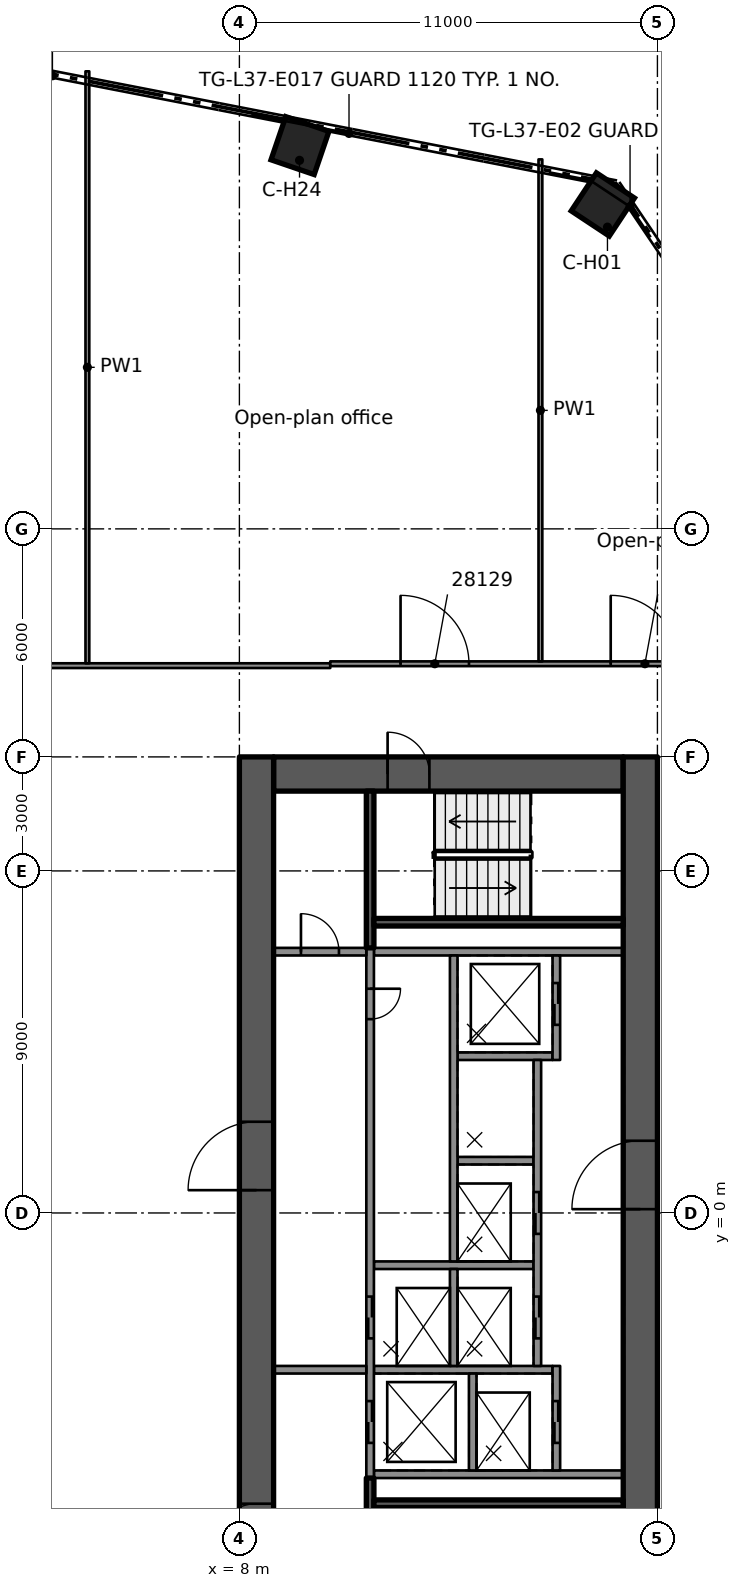
"""IFC4 building model, lengths in metres.
Left out: names, types, materials, properties, quantities, classifications, styles, units other than length and angle.
Written with IfcOpenShell. Run it as: python <this file> out.ifc"""

import sys

from ifc_helpers import new_model, si_unit, direction, frame, frame_2d, origin, origin_2d, place, context, subcontext, project, spatial, rectangle, extrude, element, fill, save


model = new_model("IFC4")
c1 = context("Model", 3, precision=1e-05, world=origin(), true_north=direction((0.0, 1.0)))
c2 = subcontext(c1, "Body", "Model", "MODEL_VIEW")
j1 = project(units=[si_unit("LENGTHUNIT", "METRE"), si_unit("PLANEANGLEUNIT", "RADIAN")], contexts=[c1])
p1 = place(None, origin())
s1 = spatial("IfcSite", under=j1, at=p1, CompositionType="ELEMENT")
p2 = place(p1, origin())
s2 = spatial("IfcBuilding", under=s1, at=p2, CompositionType="ELEMENT")
p3 = place(p2, frame((0.0, 0.0, 145.6)))
s3 = spatial("IfcBuildingStorey", under=s2, at=p3, CompositionType="ELEMENT", Elevation=145.6)
p4 = place(p3, frame((8.9, 11.55, 0.0), z_axis=(0.0, 0.0, 1.0), x_axis=(1.0, 0.0, 0.0)))
e1 = element("IfcWall", 1, at=p4, inside=s3, PredefinedType="SHEAR", context=c2, shape_type="SweptSolid", body=[
    extrude(rectangle(XDim=9.2, YDim=0.9, at=frame_2d((4.6, 0.0))), origin(), (0.0, 0.0, 1.0), 3.5),
])
p5 = place(p4, frame((3.0, 0.0, 0.0)))
e2 = element("IfcOpeningElement", 2, at=p5, cuts=e1, PredefinedType="OPENING", context=c2, shape_type="SweptSolid", body=[
    extrude(rectangle(XDim=1.1, YDim=2.1, at=frame_2d((0.55, 1.05))), frame((0.0, 0.46, 0.0), z_axis=(0.0, -1.0, 0.0), x_axis=(1.0, 0.0, 0.0)), (0.0, 0.0, 1.0), 0.92),
])
p6 = place(p3, frame((8.45, -12.0, 0.0), z_axis=(0.0, 0.0, 1.0), x_axis=(0.0, 1.0, 0.0)))
e3 = element("IfcWall", 3, at=p6, inside=s3, PredefinedType="SHEAR", context=c2, shape_type="SweptSolid", body=[
    extrude(rectangle(XDim=24.0, YDim=0.9, at=frame_2d((12.0, 0.0))), origin(), (0.0, 0.0, 1.0), 3.5),
])
p7 = place(p6, frame((12.6, 0.0, 0.0)))
e4 = element("IfcOpeningElement", 4, at=p7, cuts=e3, PredefinedType="OPENING", context=c2, shape_type="SweptSolid", body=[
    extrude(rectangle(XDim=1.8, YDim=2.1, at=frame_2d((0.9, 1.05))), frame((0.0, 0.46, 0.0), z_axis=(0.0, -1.0, 0.0), x_axis=(1.0, 0.0, 0.0)), (0.0, 0.0, 1.0), 0.92),
])
p8 = place(p6, frame((3.25, 0.0, 0.0)))
e5 = element("IfcOpeningElement", 5, at=p8, cuts=e3, PredefinedType="OPENING", context=c2, shape_type="SweptSolid", body=[
    extrude(rectangle(XDim=1.1, YDim=2.1, at=frame_2d((0.55, 1.05))), frame((0.0, 0.46, 0.0), z_axis=(0.0, -1.0, 0.0), x_axis=(1.0, 0.0, 0.0)), (0.0, 0.0, 1.0), 0.92),
])
p9 = place(p3, frame((18.55, -12.0, 0.0), z_axis=(0.0, 0.0, 1.0), x_axis=(0.0, 1.0, 0.0)))
e6 = element("IfcWall", 6, at=p9, inside=s3, PredefinedType="SHEAR", context=c2, shape_type="SweptSolid", body=[
    extrude(rectangle(XDim=24.0, YDim=0.9, at=frame_2d((12.0, 0.0))), origin(), (0.0, 0.0, 1.0), 3.5),
])
p10 = place(p9, frame((12.1, 0.0, 0.0)))
e7 = element("IfcOpeningElement", 7, at=p10, cuts=e6, PredefinedType="OPENING", context=c2, shape_type="SweptSolid", body=[
    extrude(rectangle(XDim=1.8, YDim=2.1, at=frame_2d((0.9, 1.05))), frame((0.0, 0.46, 0.0), z_axis=(0.0, -1.0, 0.0), x_axis=(1.0, 0.0, 0.0)), (0.0, 0.0, 1.0), 0.92),
])
for number, where, z_axis, x_axis in (
    (8, (17.564, 26.536, 0.0), (0.0, 0.0, 1.0), (0.552, 0.834, 0.0)),
    (9, (9.594, 28.085, 0.0), (0.0, 0.0, 1.0), (0.323, 0.946, 0.0)),
):
    element("IfcColumn", number, at=place(p3, frame(where, z_axis=z_axis, x_axis=x_axis)), inside=s3, PredefinedType="COLUMN", context=c2, shape_type="SweptSolid", body=[
        extrude(rectangle(XDim=1.2, YDim=1.2, at=origin_2d()), origin(), (0.0, 0.0, 1.0), 3.5),
    ])
for number, where, z_axis, x_axis in (
    (10, (11.54, -6.875, 0.0), (0.0, 0.0, 1.0), (1.0, 0.0, 0.0)),
    (11, (11.54, 6.875, 0.0), (0.0, 0.0, 1.0), (1.0, 0.0, 0.0)),
):
    element("IfcWall", number, at=place(p3, frame(where, z_axis=z_axis, x_axis=x_axis)), inside=s3, PredefinedType="SOLIDWALL", context=c2, shape_type="SweptSolid", body=[
        extrude(rectangle(XDim=6.56, YDim=0.2, at=frame_2d((3.28, 0.0))), origin(), (0.0, 0.0, 1.0), 3.09),
    ])
p11 = place(p3, frame((13.74, 4.125, 0.0), z_axis=(0.0, 0.0, 1.0), x_axis=(1.0, 0.0, 0.0)))
e12 = element("IfcWall", 12, at=p11, inside=s3, PredefinedType="SOLIDWALL", context=c2, shape_type="SweptSolid", body=[
    extrude(rectangle(XDim=2.5, YDim=0.2, at=frame_2d((1.25, 0.0))), origin(), (0.0, 0.0, 1.0), 3.09),
])
p12 = place(p3, frame((13.74, 1.375, 0.0), z_axis=(0.0, 0.0, 1.0), x_axis=(1.0, 0.0, 0.0)))
e13 = element("IfcWall", 13, at=p12, inside=s3, PredefinedType="SOLIDWALL", context=c2, shape_type="SweptSolid", body=[
    extrude(rectangle(XDim=2.0, YDim=0.2, at=frame_2d((1.0, 0.0))), origin(), (0.0, 0.0, 1.0), 3.09),
])
p13 = place(p3, frame((11.54, -1.375, 0.0), z_axis=(0.0, 0.0, 1.0), x_axis=(1.0, 0.0, 0.0)))
e14 = element("IfcWall", 14, at=p13, inside=s3, PredefinedType="SOLIDWALL", context=c2, shape_type="SweptSolid", body=[
    extrude(rectangle(XDim=4.2, YDim=0.2, at=frame_2d((2.1, 0.0))), origin(), (0.0, 0.0, 1.0), 3.09),
])
p14 = place(p3, frame((11.54, -4.125, 0.0), z_axis=(0.0, 0.0, 1.0), x_axis=(1.0, 0.0, 0.0)))
e15 = element("IfcWall", 15, at=p14, inside=s3, PredefinedType="SOLIDWALL", context=c2, shape_type="SweptSolid", body=[
    extrude(rectangle(XDim=4.7, YDim=0.2, at=frame_2d((2.35, 0.0))), origin(), (0.0, 0.0, 1.0), 3.09),
])
p15 = place(p3, frame((11.44, 6.975, 0.0), z_axis=(0.0, 0.0, 1.0), x_axis=(0.0, -1.0, 0.0)))
e16 = element("IfcWall", 16, at=p15, inside=s3, PredefinedType="SOLIDWALL", context=c2, shape_type="SweptSolid", body=[
    extrude(rectangle(XDim=13.95, YDim=0.2, at=frame_2d((6.975, 0.0))), origin(), (0.0, 0.0, 1.0), 3.09),
])
p16 = place(p15, frame((9.175, 0.0, 0.0)))
e17 = element("IfcOpeningElement", 17, at=p16, cuts=e16, PredefinedType="OPENING", context=c2, shape_type="SweptSolid", body=[
    extrude(rectangle(XDim=1.1, YDim=2.1, at=frame_2d((0.55, 1.05))), frame((0.0, 0.11, 0.0), z_axis=(0.0, -1.0, 0.0), x_axis=(1.0, 0.0, 0.0)), (0.0, 0.0, 1.0), 0.22),
])
p17 = place(p15, frame((11.925, 0.0, 0.0)))
e18 = element("IfcOpeningElement", 18, at=p17, cuts=e16, PredefinedType="OPENING", context=c2, shape_type="SweptSolid", body=[
    extrude(rectangle(XDim=1.1, YDim=2.1, at=frame_2d((0.55, 1.05))), frame((0.0, 0.11, 0.0), z_axis=(0.0, -1.0, 0.0), x_axis=(1.0, 0.0, 0.0)), (0.0, 0.0, 1.0), 0.22),
])
p18 = place(p15, frame((1.075, 0.0, 0.0)))
e19 = element("IfcOpeningElement", 19, at=p18, cuts=e16, PredefinedType="OPENING", context=c2, shape_type="SweptSolid", body=[
    extrude(rectangle(XDim=0.8, YDim=2.1, at=frame_2d((0.4, 1.05))), frame((0.0, 0.11, 0.0), z_axis=(0.0, -1.0, 0.0), x_axis=(1.0, 0.0, 0.0)), (0.0, 0.0, 1.0), 0.22),
])
p19 = place(p3, frame((13.64, 6.775, 0.0), z_axis=(0.0, 0.0, 1.0), x_axis=(0.0, -1.0, 0.0)))
e20 = element("IfcWall", 20, at=p19, inside=s3, PredefinedType="SOLIDWALL", context=c2, shape_type="SweptSolid", body=[
    extrude(rectangle(XDim=8.05, YDim=0.2, at=frame_2d((4.025, 0.0))), origin(), (0.0, 0.0, 1.0), 3.09),
])
for number, where, z_axis, x_axis in (
    (21, (13.64, -1.475, 0.0), (0.0, 0.0, 1.0), (0.0, -1.0, 0.0)),
    (22, (14.14, -4.225, 0.0), (0.0, 0.0, 1.0), (0.0, -1.0, 0.0)),
):
    element("IfcWall", number, at=place(p3, frame(where, z_axis=z_axis, x_axis=x_axis)), inside=s3, PredefinedType="SOLIDWALL", context=c2, shape_type="SweptSolid", body=[
        extrude(rectangle(XDim=2.55, YDim=0.2, at=frame_2d((1.275, 0.0))), origin(), (0.0, 0.0, 1.0), 3.09),
    ])
p20 = place(p3, frame((16.34, 6.775, 0.0), z_axis=(0.0, 0.0, 1.0), x_axis=(0.0, -1.0, 0.0)))
e23 = element("IfcWall", 23, at=p20, inside=s3, PredefinedType="SOLIDWALL", context=c2, shape_type="SweptSolid", body=[
    extrude(rectangle(XDim=2.75, YDim=0.2, at=frame_2d((1.375, 0.0))), origin(), (0.0, 0.0, 1.0), 3.09),
])
p21 = place(p20, frame((0.725, 0.0, 0.0)))
e24 = element("IfcOpeningElement", 24, at=p21, cuts=e23, PredefinedType="OPENING", context=c2, shape_type="SweptSolid", body=[
    extrude(rectangle(XDim=1.1, YDim=2.1, at=frame_2d((0.55, 1.05))), frame((0.0, 0.11, 0.0), z_axis=(0.0, -1.0, 0.0), x_axis=(1.0, 0.0, 0.0)), (0.0, 0.0, 1.0), 0.22),
])
p22 = place(p3, frame((15.84, 4.025, 0.0), z_axis=(0.0, 0.0, 1.0), x_axis=(0.0, -1.0, 0.0)))
e25 = element("IfcWall", 25, at=p22, inside=s3, PredefinedType="SOLIDWALL", context=c2, shape_type="SweptSolid", body=[
    extrude(rectangle(XDim=8.05, YDim=0.2, at=frame_2d((4.025, 0.0))), origin(), (0.0, 0.0, 1.0), 3.09),
])
p23 = place(p22, frame((3.475, 0.0, 0.0)))
e26 = element("IfcOpeningElement", 26, at=p23, cuts=e25, PredefinedType="OPENING", context=c2, shape_type="SweptSolid", body=[
    extrude(rectangle(XDim=1.1, YDim=2.1, at=frame_2d((0.55, 1.05))), frame((0.0, 0.11, 0.0), z_axis=(0.0, -1.0, 0.0), x_axis=(1.0, 0.0, 0.0)), (0.0, 0.0, 1.0), 0.22),
])
p24 = place(p22, frame((6.225, 0.0, 0.0)))
e27 = element("IfcOpeningElement", 27, at=p24, cuts=e25, PredefinedType="OPENING", context=c2, shape_type="SweptSolid", body=[
    extrude(rectangle(XDim=1.1, YDim=2.1, at=frame_2d((0.55, 1.05))), frame((0.0, 0.11, 0.0), z_axis=(0.0, -1.0, 0.0), x_axis=(1.0, 0.0, 0.0)), (0.0, 0.0, 1.0), 0.22),
])
p25 = place(p3, frame((16.34, -4.025, 0.0), z_axis=(0.0, 0.0, 1.0), x_axis=(0.0, -1.0, 0.0)))
e28 = element("IfcWall", 28, at=p25, inside=s3, PredefinedType="SOLIDWALL", context=c2, shape_type="SweptSolid", body=[
    extrude(rectangle(XDim=2.75, YDim=0.2, at=frame_2d((1.375, 0.0))), origin(), (0.0, 0.0, 1.0), 3.09),
])
p26 = place(p25, frame((0.925, 0.0, 0.0)))
e29 = element("IfcOpeningElement", 29, at=p26, cuts=e28, PredefinedType="OPENING", context=c2, shape_type="SweptSolid", body=[
    extrude(rectangle(XDim=1.1, YDim=2.1, at=frame_2d((0.55, 1.05))), frame((0.0, 0.11, 0.0), z_axis=(0.0, -1.0, 0.0), x_axis=(1.0, 0.0, 0.0)), (0.0, 0.0, 1.0), 0.22),
])
p27 = place(p3, frame((11.44, -6.975, 0.0), z_axis=(0.0, 0.0, 1.0), x_axis=(0.0, -1.0, 0.0)))
e30 = element("IfcWall", 30, at=p27, inside=s3, PredefinedType="SOLIDWALL", context=c2, shape_type="SweptSolid", body=[
    extrude(rectangle(XDim=4.125, YDim=0.2, at=frame_2d((2.062, 0.0))), origin(), (0.0, 0.0, 1.0), 3.09),
])
p28 = place(p27, frame((2.1, 0.0, 0.0)))
e31 = element("IfcOpeningElement", 31, at=p28, cuts=e30, PredefinedType="OPENING", context=c2, shape_type="SweptSolid", body=[
    extrude(rectangle(XDim=1.1, YDim=2.1, at=frame_2d((0.55, 1.05))), frame((0.0, 0.11, 0.0), z_axis=(0.0, -1.0, 0.0), x_axis=(1.0, 0.0, 0.0)), (0.0, 0.0, 1.0), 0.22),
])
p29 = place(p3, frame((11.54, -7.65, 0.0), z_axis=(0.0, 0.0, 1.0), x_axis=(1.0, 0.0, 0.0)))
e32 = element("IfcWall", 32, at=p29, inside=s3, PredefinedType="SOLIDWALL", context=c2, shape_type="SweptSolid", body=[
    extrude(rectangle(XDim=6.56, YDim=0.2, at=frame_2d((3.28, 0.0))), origin(), (0.0, 0.0, 1.0), 3.09),
])
p30 = place(p3, frame((11.44, 11.1, 0.0), z_axis=(0.0, 0.0, 1.0), x_axis=(0.0, -1.0, 0.0)))
e33 = element("IfcWall", 33, at=p30, inside=s3, PredefinedType="SOLIDWALL", context=c2, shape_type="SweptSolid", body=[
    extrude(rectangle(XDim=4.125, YDim=0.2, at=frame_2d((2.062, 0.0))), origin(), (0.0, 0.0, 1.0), 3.09),
])
p31 = place(p3, frame((11.54, 7.65, 0.0), z_axis=(0.0, 0.0, 1.0), x_axis=(1.0, 0.0, 0.0)))
e34 = element("IfcWall", 34, at=p31, inside=s3, PredefinedType="SOLIDWALL", context=c2, shape_type="SweptSolid", body=[
    extrude(rectangle(XDim=6.56, YDim=0.2, at=frame_2d((3.28, 0.0))), origin(), (0.0, 0.0, 1.0), 3.09),
])
p32 = place(p3, frame((8.9, -4.125, 0.0), z_axis=(0.0, 0.0, 1.0), x_axis=(1.0, 0.0, 0.0)))
e35 = element("IfcWall", 35, at=p32, inside=s3, PredefinedType="PARTITIONING", context=c2, shape_type="SweptSolid", body=[
    extrude(rectangle(XDim=2.44, YDim=0.2, at=frame_2d((1.22, 0.0))), origin(), (0.0, 0.0, 1.0), 3.09),
])
p33 = place(p3, frame((8.9, 6.875, 0.0), z_axis=(0.0, 0.0, 1.0), x_axis=(1.0, 0.0, 0.0)))
e36 = element("IfcWall", 36, at=p33, inside=s3, PredefinedType="PARTITIONING", context=c2, shape_type="SweptSolid", body=[
    extrude(rectangle(XDim=2.44, YDim=0.2, at=frame_2d((1.22, 0.0))), origin(), (0.0, 0.0, 1.0), 3.09),
])
p34 = place(p33, frame((0.72, 0.0, 0.0)))
e37 = element("IfcOpeningElement", 37, at=p34, cuts=e36, PredefinedType="OPENING", context=c2, shape_type="SweptSolid", body=[
    extrude(rectangle(XDim=1.0, YDim=2.1, at=frame_2d((0.5, 1.05))), frame((0.0, 0.11, 0.0), z_axis=(0.0, -1.0, 0.0), x_axis=(1.0, 0.0, 0.0)), (0.0, 0.0, 1.0), 0.22),
])
p35 = place(p3, frame((-10.39, 14.401, 0.0), z_axis=(0.0, 0.0, 1.0), x_axis=(1.0, 0.0, 0.0)))
e38 = element("IfcWall", 38, at=p35, inside=s3, PredefinedType="PARTITIONING", context=c2, shape_type="SweptSolid", body=[
    extrude(rectangle(XDim=20.781, YDim=0.125, at=frame_2d((10.391, 0.0))), origin(), (0.0, 0.0, 1.0), 3.08),
])
p36 = place(p35, frame((10.295, 0.0, 0.0)))
e39 = element("IfcOpeningElement", 39, at=p36, cuts=e38, PredefinedType="OPENING", context=c2, shape_type="SweptSolid", body=[
    extrude(rectangle(XDim=1.1, YDim=2.1, at=frame_2d((0.55, 1.05))), frame((0.0, 0.073, 0.0), z_axis=(0.0, -1.0, 0.0), x_axis=(1.0, 0.0, 0.0)), (0.0, 0.0, 1.0), 0.145),
])
p37 = place(p35, frame((2.6, 0.0, 0.0)))
e40 = element("IfcOpeningElement", 40, at=p37, cuts=e38, PredefinedType="OPENING", context=c2, shape_type="SweptSolid", body=[
    extrude(rectangle(XDim=1.8, YDim=2.1, at=frame_2d((0.9, 1.05))), frame((0.0, 0.073, 0.0), z_axis=(0.0, -1.0, 0.0), x_axis=(1.0, 0.0, 0.0)), (0.0, 0.0, 1.0), 0.145),
])
p38 = place(p3, frame((10.391, 14.451, 0.0), z_axis=(0.0, 0.0, 1.0), x_axis=(1.0, 0.0, 0.0)))
e41 = element("IfcWall", 41, at=p38, inside=s3, PredefinedType="PARTITIONING", context=c2, shape_type="SweptSolid", body=[
    extrude(rectangle(XDim=10.996, YDim=0.125, at=frame_2d((5.498, 0.0))), origin(), (0.0, 0.0, 1.0), 3.08),
])
p39 = place(p38, frame((7.38, 0.0, 0.0)))
e42 = element("IfcOpeningElement", 42, at=p39, cuts=e41, PredefinedType="OPENING", context=c2, shape_type="SweptSolid", body=[
    extrude(rectangle(XDim=1.8, YDim=2.1, at=frame_2d((0.9, 1.05))), frame((0.0, 0.073, 0.0), z_axis=(0.0, -1.0, 0.0), x_axis=(1.0, 0.0, 0.0)), (0.0, 0.0, 1.0), 0.145),
])
p40 = place(p38, frame((1.85, 0.0, 0.0)))
e43 = element("IfcOpeningElement", 43, at=p40, cuts=e41, PredefinedType="OPENING", context=c2, shape_type="SweptSolid", body=[
    extrude(rectangle(XDim=1.8, YDim=2.1, at=frame_2d((0.9, 1.05))), frame((0.0, 0.073, 0.0), z_axis=(0.0, -1.0, 0.0), x_axis=(1.0, 0.0, 0.0)), (0.0, 0.0, 1.0), 0.145),
])
p41 = place(p3, frame((15.921, 14.514, 0.0), z_axis=(0.0, 0.0, 1.0), x_axis=(0.0, 1.0, 0.0)))
e44 = element("IfcWall", 44, at=p41, inside=s3, PredefinedType="PARTITIONING", context=c2, shape_type="SweptSolid", body=[
    extrude(rectangle(XDim=13.208, YDim=0.1, at=frame_2d((6.604, 0.0))), origin(), (0.0, 0.0, 1.0), 3.08),
])
p42 = place(p3, frame((4.0, 14.463, 0.0), z_axis=(0.0, 0.0, 1.0), x_axis=(0.0, 1.0, 0.0)))
e45 = element("IfcWall", 45, at=p42, inside=s3, PredefinedType="PARTITIONING", context=c2, shape_type="SweptSolid", body=[
    extrude(rectangle(XDim=15.576, YDim=0.1, at=frame_2d((7.788, 0.0))), origin(), (0.0, 0.0, 1.0), 3.08),
])
p43 = place(p21, origin())
e46 = element("IfcDoor", 46, at=p43, inside=s3, OperationType="DOUBLE_DOOR_SLIDING", PredefinedType="DOOR", context=c2, shape_type="SweptSolid", body=[
    extrude(rectangle(XDim=1.1, YDim=2.1, at=frame_2d((0.55, 1.05))), frame((0.0, 0.025, 0.0), z_axis=(0.0, -1.0, 0.0), x_axis=(1.0, 0.0, 0.0)), (0.0, 0.0, 1.0), 0.05),
])
fill(e24, e46)
p44 = place(p23, origin())
e47 = element("IfcDoor", 47, at=p44, inside=s3, OperationType="DOUBLE_DOOR_SLIDING", PredefinedType="DOOR", context=c2, shape_type="SweptSolid", body=[
    extrude(rectangle(XDim=1.1, YDim=2.1, at=frame_2d((0.55, 1.05))), frame((0.0, 0.025, 0.0), z_axis=(0.0, -1.0, 0.0), x_axis=(1.0, 0.0, 0.0)), (0.0, 0.0, 1.0), 0.05),
])
fill(e26, e47)
p45 = place(p16, origin())
e48 = element("IfcDoor", 48, at=p45, inside=s3, OperationType="DOUBLE_DOOR_SLIDING", PredefinedType="DOOR", context=c2, shape_type="SweptSolid", body=[
    extrude(rectangle(XDim=1.1, YDim=2.1, at=frame_2d((0.55, 1.05))), frame((0.0, 0.025, 0.0), z_axis=(0.0, -1.0, 0.0), x_axis=(1.0, 0.0, 0.0)), (0.0, 0.0, 1.0), 0.05),
])
fill(e17, e48)
p46 = place(p24, origin())
e49 = element("IfcDoor", 49, at=p46, inside=s3, OperationType="DOUBLE_DOOR_SLIDING", PredefinedType="DOOR", context=c2, shape_type="SweptSolid", body=[
    extrude(rectangle(XDim=1.1, YDim=2.1, at=frame_2d((0.55, 1.05))), frame((0.0, 0.025, 0.0), z_axis=(0.0, -1.0, 0.0), x_axis=(1.0, 0.0, 0.0)), (0.0, 0.0, 1.0), 0.05),
])
fill(e27, e49)
p47 = place(p17, origin())
e50 = element("IfcDoor", 50, at=p47, inside=s3, OperationType="DOUBLE_DOOR_SLIDING", PredefinedType="DOOR", context=c2, shape_type="SweptSolid", body=[
    extrude(rectangle(XDim=1.1, YDim=2.1, at=frame_2d((0.55, 1.05))), frame((0.0, 0.025, 0.0), z_axis=(0.0, -1.0, 0.0), x_axis=(1.0, 0.0, 0.0)), (0.0, 0.0, 1.0), 0.05),
])
fill(e18, e50)
p48 = place(p26, origin())
e51 = element("IfcDoor", 51, at=p48, inside=s3, OperationType="DOUBLE_DOOR_SLIDING", PredefinedType="DOOR", context=c2, shape_type="SweptSolid", body=[
    extrude(rectangle(XDim=1.1, YDim=2.1, at=frame_2d((0.55, 1.05))), frame((0.0, 0.025, 0.0), z_axis=(0.0, -1.0, 0.0), x_axis=(1.0, 0.0, 0.0)), (0.0, 0.0, 1.0), 0.05),
])
fill(e29, e51)
p49 = place(p18, origin())
e52 = element("IfcDoor", 52, at=p49, inside=s3, OperationType="SINGLE_SWING_LEFT", PredefinedType="DOOR", context=c2, shape_type="SweptSolid", body=[
    extrude(rectangle(XDim=0.8, YDim=2.1, at=frame_2d((0.4, 1.05))), frame((0.0, 0.025, 0.0), z_axis=(0.0, -1.0, 0.0), x_axis=(1.0, 0.0, 0.0)), (0.0, 0.0, 1.0), 0.05),
])
fill(e19, e52)
p50 = place(p7, origin())
e53 = element("IfcDoor", 53, at=p50, inside=s3, OperationType="SINGLE_SWING_RIGHT", PredefinedType="DOOR", context=c2, shape_type="SweptSolid", body=[
    extrude(rectangle(XDim=1.8, YDim=2.1, at=frame_2d((0.9, 1.05))), frame((0.0, 0.025, 0.0), z_axis=(0.0, -1.0, 0.0), x_axis=(1.0, 0.0, 0.0)), (0.0, 0.0, 1.0), 0.05),
])
fill(e4, e53)
p51 = place(p10, origin())
e54 = element("IfcDoor", 54, at=p51, inside=s3, OperationType="SINGLE_SWING_RIGHT", PredefinedType="DOOR", context=c2, shape_type="SweptSolid", body=[
    extrude(rectangle(XDim=1.8, YDim=2.1, at=frame_2d((0.9, 1.05))), frame((0.0, 0.025, 0.0), z_axis=(0.0, -1.0, 0.0), x_axis=(1.0, 0.0, 0.0)), (0.0, 0.0, 1.0), 0.05),
])
fill(e7, e54)
p52 = place(p8, origin())
e55 = element("IfcDoor", 55, at=p52, inside=s3, OperationType="SINGLE_SWING_LEFT", PredefinedType="DOOR", context=c2, shape_type="SweptSolid", body=[
    extrude(rectangle(XDim=1.1, YDim=2.1, at=frame_2d((0.55, 1.05))), frame((0.0, 0.025, 0.0), z_axis=(0.0, -1.0, 0.0), x_axis=(1.0, 0.0, 0.0)), (0.0, 0.0, 1.0), 0.05),
])
fill(e5, e55)
p53 = place(p5, origin())
e56 = element("IfcDoor", 56, at=p53, inside=s3, OperationType="SINGLE_SWING_LEFT", PredefinedType="DOOR", context=c2, shape_type="SweptSolid", body=[
    extrude(rectangle(XDim=1.1, YDim=2.1, at=frame_2d((0.55, 1.05))), frame((0.0, 0.025, 0.0), z_axis=(0.0, -1.0, 0.0), x_axis=(1.0, 0.0, 0.0)), (0.0, 0.0, 1.0), 0.05),
])
fill(e2, e56)
p54 = place(p34, origin())
e57 = element("IfcDoor", 57, at=p54, inside=s3, OperationType="SINGLE_SWING_RIGHT", PredefinedType="DOOR", context=c2, shape_type="SweptSolid", body=[
    extrude(rectangle(XDim=1.0, YDim=2.1, at=frame_2d((0.5, 1.05))), frame((0.0, 0.025, 0.0), z_axis=(0.0, -1.0, 0.0), x_axis=(1.0, 0.0, 0.0)), (0.0, 0.0, 1.0), 0.05),
])
fill(e37, e57)
p55 = place(p39, origin())
e58 = element("IfcDoor", 58, at=p55, inside=s3, OperationType="DOUBLE_DOOR_SINGLE_SWING", PredefinedType="DOOR", context=c2, shape_type="SweptSolid", body=[
    extrude(rectangle(XDim=1.8, YDim=2.1, at=frame_2d((0.9, 1.05))), frame((0.0, 0.025, 0.0), z_axis=(0.0, -1.0, 0.0), x_axis=(1.0, 0.0, 0.0)), (0.0, 0.0, 1.0), 0.05),
])
fill(e42, e58)
p56 = place(p40, origin())
e59 = element("IfcDoor", 59, at=p56, inside=s3, OperationType="DOUBLE_DOOR_SINGLE_SWING", PredefinedType="DOOR", context=c2, shape_type="SweptSolid", body=[
    extrude(rectangle(XDim=1.8, YDim=2.1, at=frame_2d((0.9, 1.05))), frame((0.0, 0.025, 0.0), z_axis=(0.0, -1.0, 0.0), x_axis=(1.0, 0.0, 0.0)), (0.0, 0.0, 1.0), 0.05),
])
fill(e43, e59)
save(model, sys.argv[1])
